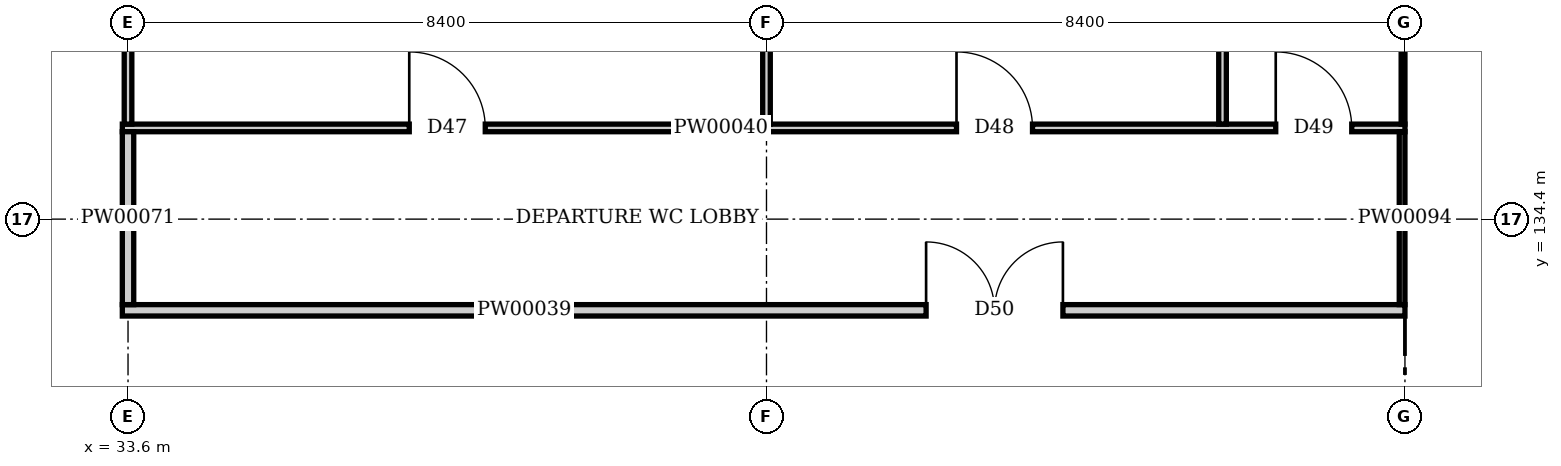
"""IFC4 building model, lengths in metres.
Left out: names, types, materials, properties, quantities, classifications, styles, units other than length and angle.
Written with IfcOpenShell. Run it as: python <this file> out.ifc"""

import sys

from ifc_helpers import new_model, si_unit, direction, frame, frame_2d, origin, place, context, subcontext, project, spatial, rectangle, extrude, element, fill, save


model = new_model("IFC4")
c1 = context("Model", 3, precision=1e-05, world=origin(), true_north=direction((0.0, 1.0)))
c2 = subcontext(c1, "Body", "Model", "MODEL_VIEW")
j1 = project(units=[si_unit("LENGTHUNIT", "METRE"), si_unit("PLANEANGLEUNIT", "RADIAN")], contexts=[c1])
p1 = place(None, origin())
s1 = spatial("IfcSite", under=j1, at=p1, CompositionType="ELEMENT")
p2 = place(p1, origin())
s2 = spatial("IfcBuilding", under=s1, at=p2, CompositionType="ELEMENT")
p3 = place(p2, origin())
s3 = spatial("IfcBuildingStorey", under=s2, at=p3, CompositionType="ELEMENT", Elevation=0.0)
p4 = place(p3, frame((33.525, 133.2, 0.0), z_axis=(0.0, 0.0, 1.0), x_axis=(1.0, 0.0, 0.0)))
e1 = element("IfcWall", 1, at=p4, inside=s3, PredefinedType="PARTITIONING", context=c2, shape_type="SweptSolid", body=[
    extrude(rectangle(XDim=16.95, YDim=0.15, at=frame_2d((8.475, 0.0))), origin(), (0.0, 0.0, 1.0), 10.8),
])
p5 = place(p4, frame((10.575, 0.0, 0.0)))
e2 = element("IfcOpeningElement", 2, at=p5, cuts=e1, PredefinedType="OPENING", context=c2, shape_type="SweptSolid", body=[
    extrude(rectangle(XDim=1.8, YDim=2.4, at=frame_2d((0.9, 1.2))), frame((0.0, 0.085, 0.0), z_axis=(0.0, -1.0, 0.0), x_axis=(1.0, 0.0, 0.0)), (0.0, 0.0, 1.0), 0.17),
])
p6 = place(p3, frame((33.525, 135.6, 0.0), z_axis=(0.0, 0.0, 1.0), x_axis=(1.0, 0.0, 0.0)))
e3 = element("IfcWall", 3, at=p6, inside=s3, PredefinedType="PARTITIONING", context=c2, shape_type="SweptSolid", body=[
    extrude(rectangle(XDim=16.95, YDim=0.1, at=frame_2d((8.475, 0.0))), origin(), (0.0, 0.0, 1.0), 10.8),
])
p7 = place(p6, frame((3.775, 0.0, 0.0)))
e4 = element("IfcOpeningElement", 4, at=p7, cuts=e3, PredefinedType="OPENING", context=c2, shape_type="SweptSolid", body=[
    extrude(rectangle(XDim=1.0, YDim=2.1, at=frame_2d((0.5, 1.05))), frame((0.0, 0.06, 0.0), z_axis=(0.0, -1.0, 0.0), x_axis=(1.0, 0.0, 0.0)), (0.0, 0.0, 1.0), 0.12),
])
p8 = place(p6, frame((10.975, 0.0, 0.0)))
e5 = element("IfcOpeningElement", 5, at=p8, cuts=e3, PredefinedType="OPENING", context=c2, shape_type="SweptSolid", body=[
    extrude(rectangle(XDim=1.0, YDim=2.1, at=frame_2d((0.5, 1.05))), frame((0.0, 0.06, 0.0), z_axis=(0.0, -1.0, 0.0), x_axis=(1.0, 0.0, 0.0)), (0.0, 0.0, 1.0), 0.12),
])
p9 = place(p6, frame((15.175, 0.0, 0.0)))
e6 = element("IfcOpeningElement", 6, at=p9, cuts=e3, PredefinedType="OPENING", context=c2, shape_type="SweptSolid", body=[
    extrude(rectangle(XDim=1.0, YDim=2.1, at=frame_2d((0.5, 1.05))), frame((0.0, 0.06, 0.0), z_axis=(0.0, -1.0, 0.0), x_axis=(1.0, 0.0, 0.0)), (0.0, 0.0, 1.0), 0.12),
])
p10 = place(p3, frame((33.6, 133.275, 0.0), z_axis=(0.0, 0.0, 1.0), x_axis=(0.0, 1.0, 0.0)))
e7 = element("IfcWall", 7, at=p10, inside=s3, PredefinedType="PARTITIONING", context=c2, shape_type="SweptSolid", body=[
    extrude(rectangle(XDim=2.275, YDim=0.15, at=frame_2d((1.138, 0.0))), origin(), (0.0, 0.0, 1.0), 10.338),
])
for number, where, z_axis, x_axis in (
    (8, (33.6, 135.65, 0.0), (0.0, 0.0, 1.0), (0.0, 1.0, 0.0)),
    (9, (42.0, 135.65, 0.0), (0.0, 0.0, 1.0), (0.0, 1.0, 0.0)),
):
    element("IfcWall", number, at=place(p3, frame(where, z_axis=z_axis, x_axis=x_axis)), inside=s3, PredefinedType="PARTITIONING", context=c2, shape_type="SweptSolid", body=[
        extrude(rectangle(XDim=6.896, YDim=0.1, at=frame_2d((3.448, 0.0))), origin(), (0.0, 0.0, 1.0), 10.338),
    ])
p11 = place(p3, frame((48.0, 135.65, 0.0), z_axis=(0.0, 0.0, 1.0), x_axis=(0.0, 1.0, 0.0)))
e10 = element("IfcWall", 10, at=p11, inside=s3, PredefinedType="PARTITIONING", context=c2, shape_type="SweptSolid", body=[
    extrude(rectangle(XDim=6.95, YDim=0.1, at=frame_2d((3.475, 0.0))), origin(), (0.0, 0.0, 1.0), 10.8),
])
p12 = place(p3, frame((50.4, 133.275, 0.0), z_axis=(0.0, 0.0, 1.0), x_axis=(0.0, 1.0, 0.0)))
e11 = element("IfcWall", 11, at=p12, inside=s3, PredefinedType="PARTITIONING", context=c2, shape_type="SweptSolid", body=[
    extrude(rectangle(XDim=2.275, YDim=0.15, at=frame_2d((1.138, 0.0))), origin(), (0.0, 0.0, 1.0), 10.338),
])
p13 = place(p3, frame((50.4, 135.65, 0.0), z_axis=(0.0, 0.0, 1.0), x_axis=(0.0, 1.0, 0.0)))
e12 = element("IfcWall", 12, at=p13, inside=s3, PredefinedType="PARTITIONING", context=c2, shape_type="SweptSolid", body=[
    extrude(rectangle(XDim=6.896, YDim=0.1, at=frame_2d((3.448, 0.0))), origin(), (0.0, 0.0, 1.0), 10.338),
])
p14 = place(p7, origin())
e13 = element("IfcDoor", 13, at=p14, inside=s3, OperationType="SINGLE_SWING_LEFT", PredefinedType="DOOR", context=c2, shape_type="SweptSolid", body=[
    extrude(rectangle(XDim=1.0, YDim=2.1, at=frame_2d((0.5, 1.05))), frame((0.0, 0.025, 0.0), z_axis=(0.0, -1.0, 0.0), x_axis=(1.0, 0.0, 0.0)), (0.0, 0.0, 1.0), 0.05),
])
fill(e4, e13)
p15 = place(p8, origin())
e14 = element("IfcDoor", 14, at=p15, inside=s3, OperationType="SINGLE_SWING_LEFT", PredefinedType="DOOR", context=c2, shape_type="SweptSolid", body=[
    extrude(rectangle(XDim=1.0, YDim=2.1, at=frame_2d((0.5, 1.05))), frame((0.0, 0.025, 0.0), z_axis=(0.0, -1.0, 0.0), x_axis=(1.0, 0.0, 0.0)), (0.0, 0.0, 1.0), 0.05),
])
fill(e5, e14)
p16 = place(p9, origin())
e15 = element("IfcDoor", 15, at=p16, inside=s3, OperationType="SINGLE_SWING_LEFT", PredefinedType="DOOR", context=c2, shape_type="SweptSolid", body=[
    extrude(rectangle(XDim=1.0, YDim=2.1, at=frame_2d((0.5, 1.05))), frame((0.0, 0.025, 0.0), z_axis=(0.0, -1.0, 0.0), x_axis=(1.0, 0.0, 0.0)), (0.0, 0.0, 1.0), 0.05),
])
fill(e6, e15)
p17 = place(p5, origin())
e16 = element("IfcDoor", 16, at=p17, inside=s3, OperationType="DOUBLE_DOOR_SINGLE_SWING", PredefinedType="DOOR", context=c2, shape_type="SweptSolid", body=[
    extrude(rectangle(XDim=1.8, YDim=2.4, at=frame_2d((0.9, 1.2))), frame((0.0, 0.025, 0.0), z_axis=(0.0, -1.0, 0.0), x_axis=(1.0, 0.0, 0.0)), (0.0, 0.0, 1.0), 0.05),
])
fill(e2, e16)
save(model, sys.argv[1])
